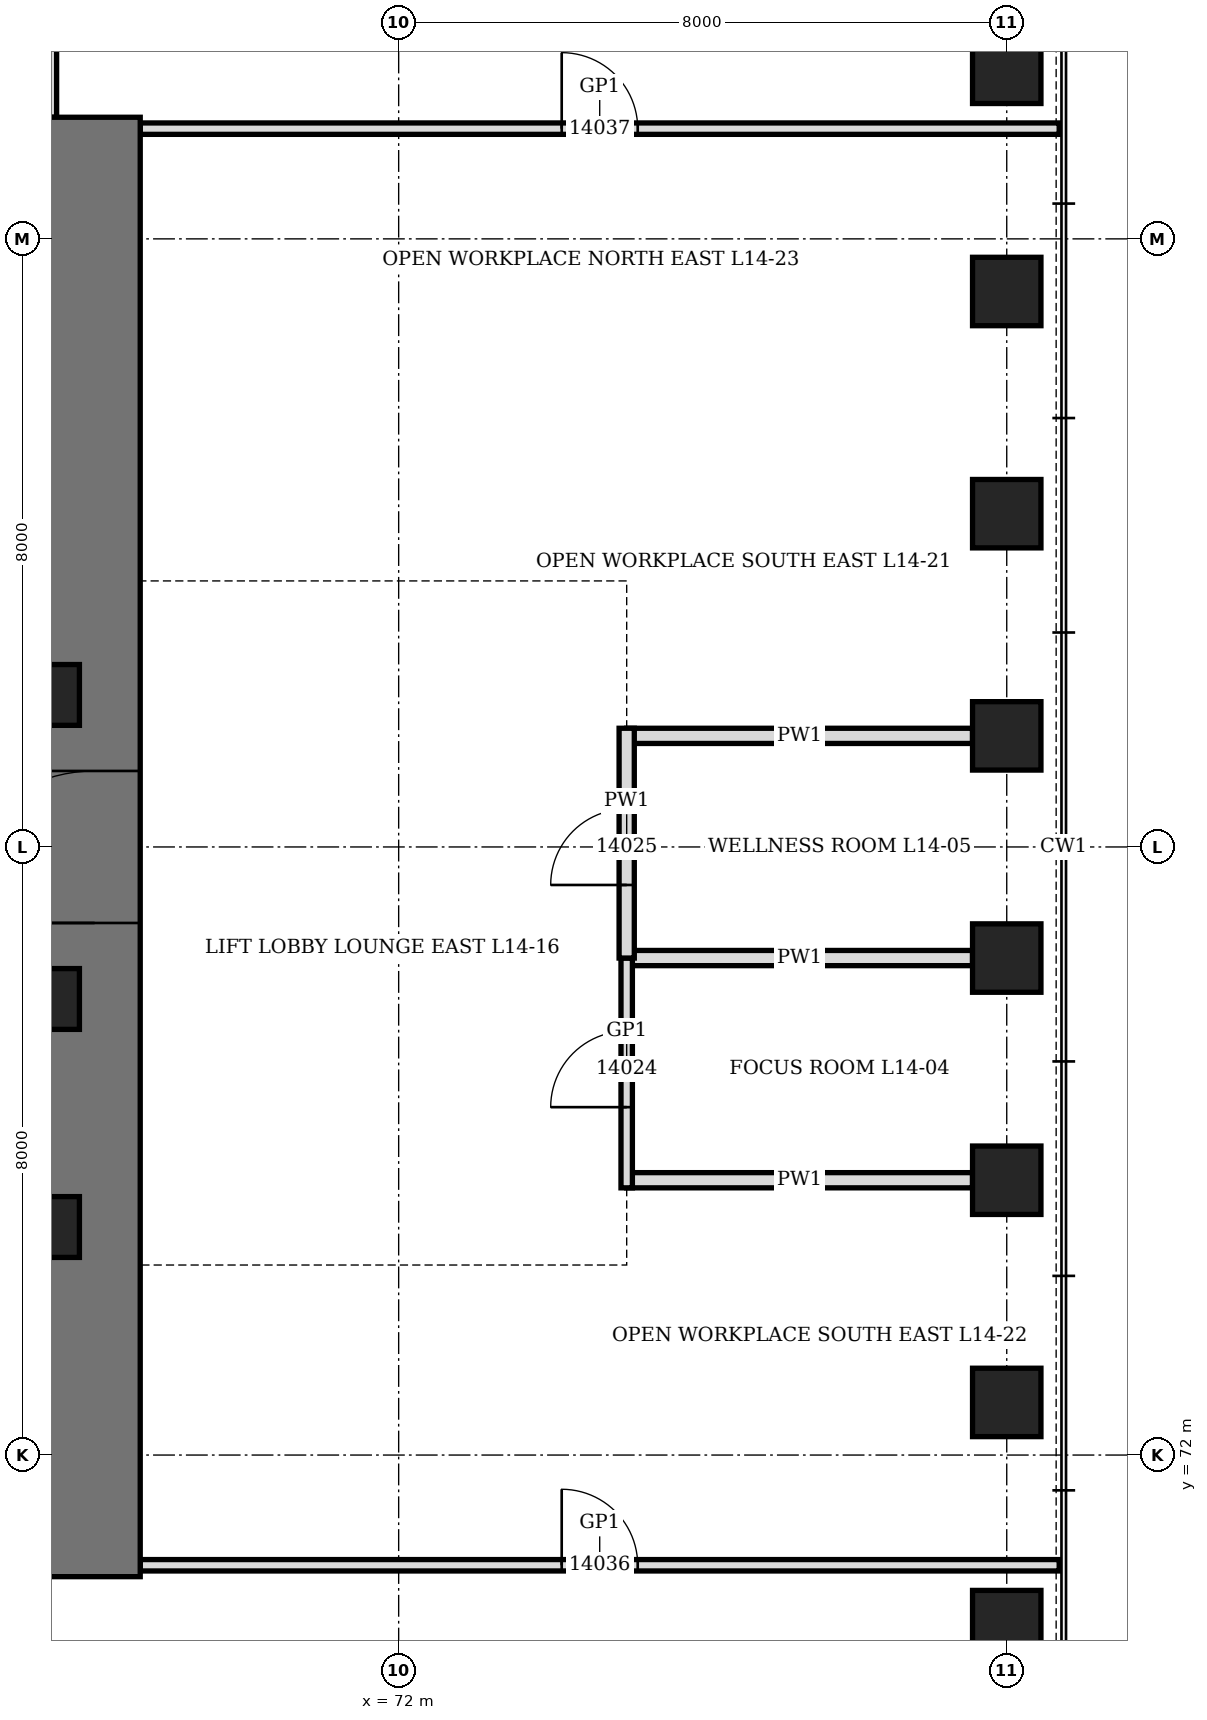
"""IFC4 building model, lengths in metres.
Left out: names, types, materials, properties, quantities, classifications, styles, units other than length and angle.
Written with IfcOpenShell. Run it as: python <this file> out.ifc"""

import sys

from ifc_helpers import new_model, si_unit, direction, frame, frame_2d, origin, origin_2d, place, context, subcontext, project, spatial, rectangle, hollow_rectangle, extrude, element, fill, save


model = new_model("IFC4")
c1 = context("Model", 3, precision=1e-05, world=origin(), true_north=direction((0.0, 1.0)))
c2 = subcontext(c1, "Body", "Model", "MODEL_VIEW")
j1 = project(units=[si_unit("LENGTHUNIT", "METRE"), si_unit("PLANEANGLEUNIT", "RADIAN")], contexts=[c1])
p1 = place(None, origin())
s1 = spatial("IfcSite", under=j1, at=p1, CompositionType="ELEMENT")
p2 = place(p1, origin())
s2 = spatial("IfcBuilding", under=s1, at=p2, CompositionType="ELEMENT")
p3 = place(p2, frame((0.0, 0.0, 68.5)))
s3 = spatial("IfcBuildingStorey", under=s2, at=p3, CompositionType="ELEMENT", Elevation=68.5)
for number, where, z_axis, x_axis in (
    (1, (80.0, 69.769, 0.0), (0.0, 0.0, 1.0), (0.0, 1.0, 0.0)),
    (2, (80.0, 72.692, 0.0), (0.0, 0.0, 1.0), (0.0, 1.0, 0.0)),
    (3, (80.0, 75.615, 0.0), (0.0, 0.0, 1.0), (0.0, 1.0, 0.0)),
    (4, (80.0, 78.539, 0.0), (0.0, 0.0, 1.0), (0.0, 1.0, 0.0)),
    (5, (80.0, 81.461, 0.0), (0.0, 0.0, 1.0), (0.0, 1.0, 0.0)),
    (6, (80.0, 84.385, 0.0), (0.0, 0.0, 1.0), (0.0, 1.0, 0.0)),
    (7, (80.0, 87.308, 0.0), (0.0, 0.0, 1.0), (0.0, 1.0, 0.0)),
    (8, (80.0, 90.231, 0.0), (0.0, 0.0, 1.0), (0.0, 1.0, 0.0)),
):
    element("IfcColumn", number, at=place(p3, frame(where, z_axis=z_axis, x_axis=x_axis)), inside=s3, PredefinedType="COLUMN", context=c2, shape_type="SweptSolid", body=[
        extrude(hollow_rectangle(XDim=0.9, YDim=0.9, WallThickness=0.12, at=origin_2d()), origin(), (0.0, 0.0, 1.0), 4.2),
    ])
p4 = place(p3, frame((68.0, 70.4, 0.0), z_axis=(0.0, 0.0, 1.0), x_axis=(0.0, 1.0, 0.0)))
e9 = element("IfcWall", 9, at=p4, inside=s3, PredefinedType="SHEAR", context=c2, shape_type="SweptSolid", body=[
    extrude(rectangle(XDim=19.2, YDim=1.2, at=frame_2d((9.6, 0.0))), origin(), (0.0, 0.0, 1.0), 4.2),
])
p5 = place(p4, frame((8.6, 0.0, 0.0)))
e10 = element("IfcOpeningElement", 10, at=p5, cuts=e9, PredefinedType="OPENING", context=c2, shape_type="SweptSolid", body=[
    extrude(rectangle(XDim=2.0, YDim=2.4, at=frame_2d((1.0, 1.2))), frame((0.0, 0.61, 0.0), z_axis=(0.0, -1.0, 0.0), x_axis=(1.0, 0.0, 0.0)), (0.0, 0.0, 1.0), 1.22),
])
for number, where, z_axis, x_axis in (
    (11, (67.4, 75.0, 0.0), (0.0, 0.0, 1.0), (1.0, 0.0, 0.0)),
    (12, (67.4, 78.0, 0.0), (0.0, 0.0, 1.0), (1.0, 0.0, 0.0)),
    (13, (67.4, 82.0, 0.0), (0.0, 0.0, 1.0), (1.0, 0.0, 0.0)),
):
    element("IfcColumn", number, at=place(p3, frame(where, z_axis=z_axis, x_axis=x_axis)), inside=s3, PredefinedType="COLUMN", context=c2, shape_type="SweptSolid", body=[
        extrude(hollow_rectangle(XDim=0.8, YDim=0.8, WallThickness=0.1, at=origin_2d()), origin(), (0.0, 0.0, 1.0), 4.2),
    ])
for number, where, z_axis, x_axis in (
    (14, (75.0, 75.615, 0.0), (0.0, 0.0, 1.0), (1.0, 0.0, 0.0)),
    (15, (75.0, 78.539, 0.0), (0.0, 0.0, 1.0), (1.0, 0.0, 0.0)),
    (16, (75.0, 81.461, 0.0), (0.0, 0.0, 1.0), (1.0, 0.0, 0.0)),
):
    element("IfcWall", number, at=place(p3, frame(where, z_axis=z_axis, x_axis=x_axis)), inside=s3, PredefinedType="PARTITIONING", context=c2, shape_type="SweptSolid", body=[
        extrude(rectangle(XDim=4.55, YDim=0.2, at=frame_2d((2.275, 0.0))), origin(), (0.0, 0.0, 1.0), 3.428),
    ])
p6 = place(p3, frame((67.4, 89.6, 0.0), z_axis=(0.0, 0.0, 1.0), x_axis=(0.0, 1.0, 0.0)))
e17 = element("IfcWall", 17, at=p6, inside=s3, PredefinedType="PARTITIONING", context=c2, shape_type="SweptSolid", body=[
    extrude(rectangle(XDim=3.0, YDim=0.2, at=frame_2d((1.5, 0.0))), origin(), (0.0, 0.0, 1.0), 4.04),
])
p7 = place(p3, frame((68.6, 70.55, 0.0), z_axis=(0.0, 0.0, 1.0), x_axis=(1.0, 0.0, 0.0)))
e18 = element("IfcWall", 18, at=p7, inside=s3, PredefinedType="PARTITIONING", context=c2, shape_type="SweptSolid", body=[
    extrude(rectangle(XDim=12.09, YDim=0.15, at=frame_2d((6.045, 0.0))), origin(), (0.0, 0.0, 1.0), 4.04),
])
p8 = place(p7, frame((5.545, 0.0, 0.0)))
e19 = element("IfcOpeningElement", 19, at=p8, cuts=e18, PredefinedType="OPENING", context=c2, shape_type="SweptSolid", body=[
    extrude(rectangle(XDim=1.0, YDim=2.4, at=frame_2d((0.5, 1.2))), frame((0.0, 0.085, 0.0), z_axis=(0.0, -1.0, 0.0), x_axis=(1.0, 0.0, 0.0)), (0.0, 0.0, 1.0), 0.17),
])
p9 = place(p3, frame((68.6, 89.45, 0.0), z_axis=(0.0, 0.0, 1.0), x_axis=(1.0, 0.0, 0.0)))
e20 = element("IfcWall", 20, at=p9, inside=s3, PredefinedType="PARTITIONING", context=c2, shape_type="SweptSolid", body=[
    extrude(rectangle(XDim=12.09, YDim=0.15, at=frame_2d((6.045, 0.0))), origin(), (0.0, 0.0, 1.0), 4.04),
])
p10 = place(p9, frame((5.545, 0.0, 0.0)))
e21 = element("IfcOpeningElement", 21, at=p10, cuts=e20, PredefinedType="OPENING", context=c2, shape_type="SweptSolid", body=[
    extrude(rectangle(XDim=1.0, YDim=2.4, at=frame_2d((0.5, 1.2))), frame((0.0, 0.085, 0.0), z_axis=(0.0, -1.0, 0.0), x_axis=(1.0, 0.0, 0.0)), (0.0, 0.0, 1.0), 0.17),
])
p11 = place(p3, frame((75.0, 75.515, 0.0), z_axis=(0.0, 0.0, 1.0), x_axis=(0.0, 1.0, 0.0)))
e22 = element("IfcWall", 22, at=p11, inside=s3, PredefinedType="PARTITIONING", context=c2, shape_type="SweptSolid", body=[
    extrude(rectangle(XDim=3.023, YDim=0.15, at=frame_2d((1.512, 0.0))), origin(), (0.0, 0.0, 1.0), 4.04),
])
p12 = place(p11, frame((1.062, 0.0, 0.0)))
e23 = element("IfcOpeningElement", 23, at=p12, cuts=e22, PredefinedType="OPENING", context=c2, shape_type="SweptSolid", body=[
    extrude(rectangle(XDim=1.0, YDim=2.4, at=frame_2d((0.5, 1.2))), frame((0.0, 0.085, 0.0), z_axis=(0.0, -1.0, 0.0), x_axis=(1.0, 0.0, 0.0)), (0.0, 0.0, 1.0), 0.17),
])
p13 = place(p3, frame((75.0, 78.539, 0.0), z_axis=(0.0, 0.0, 1.0), x_axis=(0.0, 1.0, 0.0)))
e24 = element("IfcWall", 24, at=p13, inside=s3, PredefinedType="PARTITIONING", context=c2, shape_type="SweptSolid", body=[
    extrude(rectangle(XDim=3.023, YDim=0.2, at=frame_2d((1.511, 0.0))), origin(), (0.0, 0.0, 1.0), 4.04),
])
p14 = place(p13, frame((0.961, 0.0, 0.0)))
e25 = element("IfcOpeningElement", 25, at=p14, cuts=e24, PredefinedType="OPENING", context=c2, shape_type="SweptSolid", body=[
    extrude(rectangle(XDim=1.0, YDim=2.1, at=frame_2d((0.5, 1.05))), frame((0.0, 0.11, 0.0), z_axis=(0.0, -1.0, 0.0), x_axis=(1.0, 0.0, 0.0)), (0.0, 0.0, 1.0), 0.22),
])
p15 = place(p5, origin())
e26 = element("IfcDoor", 26, at=p15, inside=s3, OperationType="DOUBLE_DOOR_SINGLE_SWING", PredefinedType="DOOR", context=c2, shape_type="SweptSolid", body=[
    extrude(rectangle(XDim=2.0, YDim=2.4, at=frame_2d((1.0, 1.2))), frame((0.0, 0.35, 0.0), z_axis=(0.0, -1.0, 0.0), x_axis=(1.0, 0.0, 0.0)), (0.0, 0.0, 1.0), 0.7),
])
fill(e10, e26)
p16 = place(p12, origin())
e27 = element("IfcDoor", 27, at=p16, inside=s3, OperationType="SINGLE_SWING_RIGHT", PredefinedType="DOOR", context=c2, shape_type="SweptSolid", body=[
    extrude(rectangle(XDim=1.0, YDim=2.4, at=frame_2d((0.5, 1.2))), frame((0.0, 0.075, 0.0), z_axis=(0.0, -1.0, 0.0), x_axis=(1.0, 0.0, 0.0)), (0.0, 0.0, 1.0), 0.149),
])
fill(e23, e27)
p17 = place(p14, origin())
e28 = element("IfcDoor", 28, at=p17, inside=s3, OperationType="SINGLE_SWING_LEFT", PredefinedType="DOOR", context=c2, shape_type="SweptSolid", body=[
    extrude(rectangle(XDim=1.0, YDim=2.1, at=frame_2d((0.5, 1.05))), frame((0.0, 0.1, 0.0), z_axis=(0.0, -1.0, 0.0), x_axis=(1.0, 0.0, 0.0)), (0.0, 0.0, 1.0), 0.199),
])
fill(e25, e28)
p18 = place(p8, origin())
e29 = element("IfcDoor", 29, at=p18, inside=s3, OperationType="SINGLE_SWING_RIGHT", PredefinedType="DOOR", context=c2, shape_type="SweptSolid", body=[
    extrude(rectangle(XDim=1.0, YDim=2.4, at=frame_2d((0.5, 1.2))), frame((0.0, 0.075, 0.0), z_axis=(0.0, -1.0, 0.0), x_axis=(1.0, 0.0, 0.0)), (0.0, 0.0, 1.0), 0.149),
])
fill(e19, e29)
p19 = place(p10, origin())
e30 = element("IfcDoor", 30, at=p19, inside=s3, OperationType="SINGLE_SWING_RIGHT", PredefinedType="DOOR", context=c2, shape_type="SweptSolid", body=[
    extrude(rectangle(XDim=1.0, YDim=2.4, at=frame_2d((0.5, 1.2))), frame((0.0, 0.075, 0.0), z_axis=(0.0, -1.0, 0.0), x_axis=(1.0, 0.0, 0.0)), (0.0, 0.0, 1.0), 0.149),
])
fill(e21, e30)
save(model, sys.argv[1])
